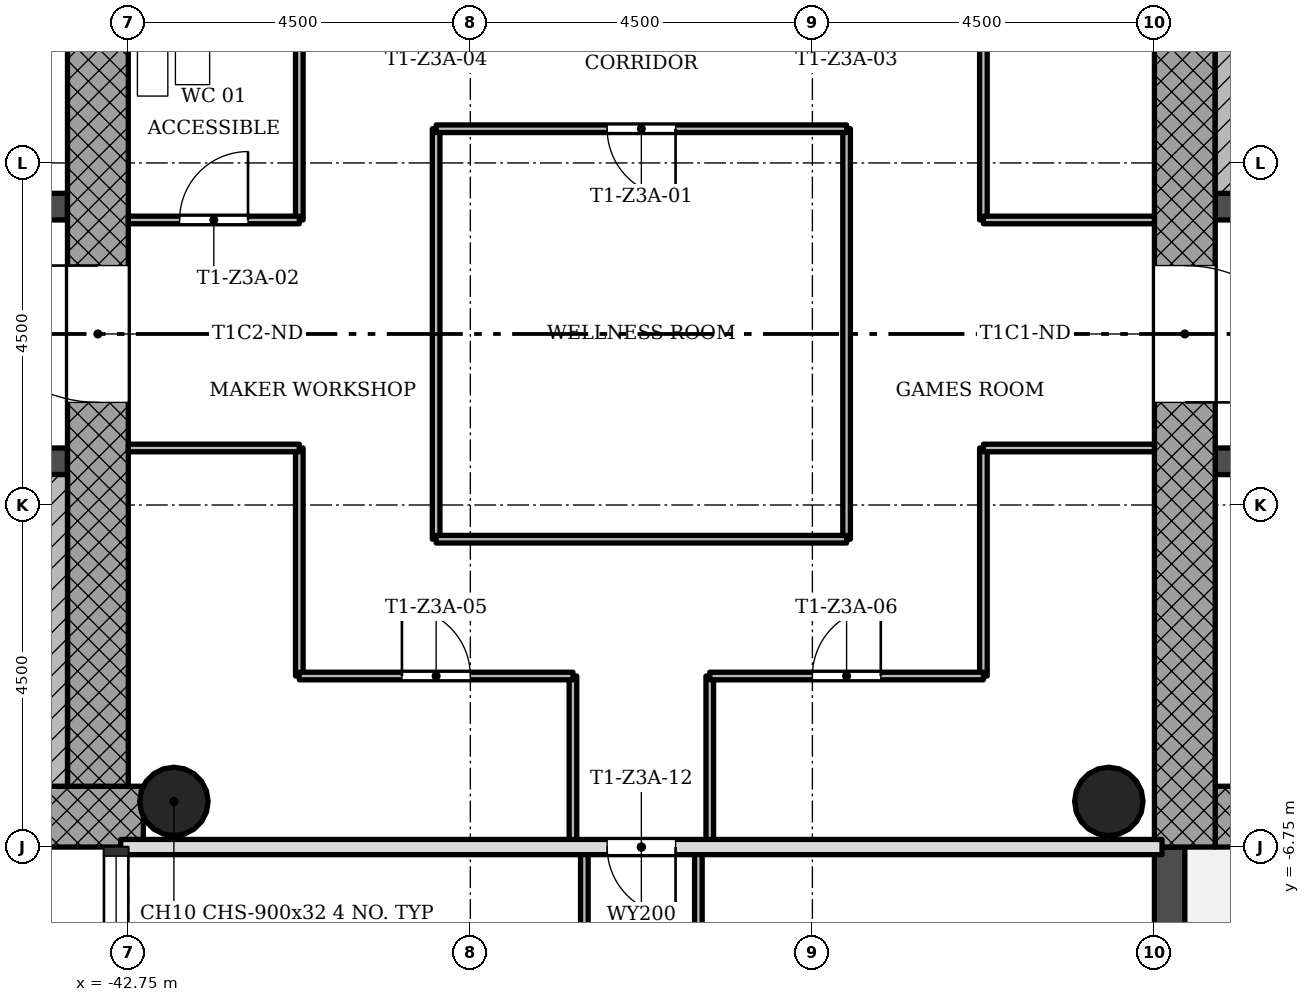
"""IFC4 building model, lengths in metres.
Left out: names, types, materials, properties, quantities, classifications, styles, units other than length and angle.
Written with IfcOpenShell. Run it as: python <this file> out.ifc"""

import sys

from ifc_helpers import new_model, si_unit, direction, frame, frame_2d, origin, origin_2d, place, context, subcontext, project, spatial, rectangle, hollow_circle, extrude, element, fill, save


model = new_model("IFC4")
c1 = context("Model", 3, precision=1e-05, world=origin(), true_north=direction((0.0, 1.0)))
c2 = subcontext(c1, "Body", "Model", "MODEL_VIEW")
j1 = project(units=[si_unit("LENGTHUNIT", "METRE"), si_unit("PLANEANGLEUNIT", "RADIAN")], contexts=[c1])
p1 = place(None, origin())
s1 = spatial("IfcSite", under=j1, at=p1, CompositionType="ELEMENT")
p2 = place(p1, origin())
s2 = spatial("IfcBuilding", under=s1, at=p2, CompositionType="ELEMENT")
p3 = place(p2, frame((0.0, 0.0, 140.5)))
s3 = spatial("IfcBuildingStorey", under=s2, at=p3, CompositionType="ELEMENT", Elevation=140.5)
p4 = place(p3, frame((-28.45, -6.35, 0.0), z_axis=(0.0, 0.0, 1.0), x_axis=(1.0, 0.0, 0.0)))
e1 = element("IfcWall", 1, at=p4, inside=s3, PredefinedType="SHEAR", context=c2, shape_type="SweptSolid", body=[
    extrude(rectangle(XDim=8.2, YDim=0.8, at=frame_2d((4.1, 0.0))), origin(), (0.0, 0.0, 1.0), 3.4),
])
p5 = place(p3, frame((-28.85, 5.95, 0.0), z_axis=(0.0, 0.0, 1.0), x_axis=(0.0, -1.0, 0.0)))
e2 = element("IfcWall", 2, at=p5, inside=s3, PredefinedType="SHEAR", context=c2, shape_type="SweptSolid", body=[
    extrude(rectangle(XDim=12.7, YDim=0.8, at=frame_2d((6.35, 0.0))), origin(), (0.0, 0.0, 1.0), 3.4),
])
p6 = place(p5, frame((5.05, 0.0, 0.0)))
e3 = element("IfcOpeningElement", 3, at=p6, cuts=e2, PredefinedType="OPENING", context=c2, shape_type="SweptSolid", body=[
    extrude(rectangle(XDim=1.8, YDim=2.1, at=frame_2d((0.9, 1.05))), frame((0.0, 0.41, 0.0), z_axis=(0.0, -1.0, 0.0), x_axis=(1.0, 0.0, 0.0)), (0.0, 0.0, 1.0), 0.82),
])
p7 = place(p3, frame((-28.45, -1.675, 0.0), z_axis=(0.0, 0.0, 1.0), x_axis=(1.0, 0.0, 0.0)))
e4 = element("IfcWall", 4, at=p7, inside=s3, PredefinedType="SHEAR", context=c2, shape_type="SweptSolid", body=[
    extrude(rectangle(XDim=7.4, YDim=0.35, at=frame_2d((3.7, 0.0))), origin(), (0.0, 0.0, 1.0), 3.4),
])
p8 = place(p7, frame((0.95, 0.0, 0.0)))
e5 = element("IfcOpeningElement", 5, at=p8, cuts=e4, PredefinedType="OPENING", context=c2, shape_type="SweptSolid", body=[
    extrude(rectangle(XDim=1.1, YDim=2.1, at=frame_2d((0.55, 1.05))), frame((0.0, 0.185, 0.0), z_axis=(0.0, -1.0, 0.0), x_axis=(1.0, 0.0, 0.0)), (0.0, 0.0, 1.0), 0.37),
])
p9 = place(p7, frame((3.15, 0.0, 0.0)))
e6 = element("IfcOpeningElement", 6, at=p9, cuts=e4, PredefinedType="OPENING", context=c2, shape_type="SweptSolid", body=[
    extrude(rectangle(XDim=1.1, YDim=2.1, at=frame_2d((0.55, 1.05))), frame((0.0, 0.185, 0.0), z_axis=(0.0, -1.0, 0.0), x_axis=(1.0, 0.0, 0.0)), (0.0, 0.0, 1.0), 0.37),
])
p10 = place(p7, frame((5.35, 0.0, 0.0)))
e7 = element("IfcOpeningElement", 7, at=p10, cuts=e4, PredefinedType="OPENING", context=c2, shape_type="SweptSolid", body=[
    extrude(rectangle(XDim=1.1, YDim=2.1, at=frame_2d((0.55, 1.05))), frame((0.0, 0.185, 0.0), z_axis=(0.0, -1.0, 0.0), x_axis=(1.0, 0.0, 0.0)), (0.0, 0.0, 1.0), 0.37),
])
p11 = place(p3, frame((-28.45, 1.675, 0.0), z_axis=(0.0, 0.0, 1.0), x_axis=(1.0, 0.0, 0.0)))
e8 = element("IfcWall", 8, at=p11, inside=s3, PredefinedType="SHEAR", context=c2, shape_type="SweptSolid", body=[
    extrude(rectangle(XDim=7.4, YDim=0.35, at=frame_2d((3.7, 0.0))), origin(), (0.0, 0.0, 1.0), 3.4),
])
p12 = place(p11, frame((0.85, 0.0, 0.0)))
e9 = element("IfcOpeningElement", 9, at=p12, cuts=e8, PredefinedType="OPENING", context=c2, shape_type="SweptSolid", body=[
    extrude(rectangle(XDim=0.9, YDim=2.1, at=frame_2d((0.45, 1.05))), frame((0.0, 0.185, 0.0), z_axis=(0.0, -1.0, 0.0), x_axis=(1.0, 0.0, 0.0)), (0.0, 0.0, 1.0), 0.37),
])
p13 = place(p3, frame((-50.95, -6.35, 0.0), z_axis=(0.0, 0.0, 1.0), x_axis=(1.0, 0.0, 0.0)))
e10 = element("IfcWall", 10, at=p13, inside=s3, PredefinedType="SHEAR", context=c2, shape_type="SweptSolid", body=[
    extrude(rectangle(XDim=8.398, YDim=0.8, at=frame_2d((4.199, 0.0))), origin(), (0.0, 0.0, 1.0), 3.4),
])
p14 = place(p3, frame((-43.15, -5.95, 0.0), z_axis=(0.0, 0.0, 1.0), x_axis=(0.0, 1.0, 0.0)))
e11 = element("IfcWall", 11, at=p14, inside=s3, PredefinedType="SHEAR", context=c2, shape_type="SweptSolid", body=[
    extrude(rectangle(XDim=12.7, YDim=0.8, at=frame_2d((6.35, 0.0))), origin(), (0.0, 0.0, 1.0), 3.4),
])
p15 = place(p14, frame((5.05, 0.0, 0.0)))
e12 = element("IfcOpeningElement", 12, at=p15, cuts=e11, PredefinedType="OPENING", context=c2, shape_type="SweptSolid", body=[
    extrude(rectangle(XDim=1.8, YDim=2.1, at=frame_2d((0.9, 1.05))), frame((0.0, 0.41, 0.0), z_axis=(0.0, -1.0, 0.0), x_axis=(1.0, 0.0, 0.0)), (0.0, 0.0, 1.0), 0.82),
])
p16 = place(p3, frame((-50.95, -1.675, 0.0), z_axis=(0.0, 0.0, 1.0), x_axis=(1.0, 0.0, 0.0)))
e13 = element("IfcWall", 13, at=p16, inside=s3, PredefinedType="SHEAR", context=c2, shape_type="SweptSolid", body=[
    extrude(rectangle(XDim=7.4, YDim=0.35, at=frame_2d((3.7, 0.0))), origin(), (0.0, 0.0, 1.0), 3.4),
])
p17 = place(p16, frame((5.65, 0.0, 0.0)))
e14 = element("IfcOpeningElement", 14, at=p17, cuts=e13, PredefinedType="OPENING", context=c2, shape_type="SweptSolid", body=[
    extrude(rectangle(XDim=0.9, YDim=2.1, at=frame_2d((0.45, 1.05))), frame((0.0, 0.185, 0.0), z_axis=(0.0, -1.0, 0.0), x_axis=(1.0, 0.0, 0.0)), (0.0, 0.0, 1.0), 0.37),
])
p18 = place(p3, frame((-50.95, 1.675, 0.0), z_axis=(0.0, 0.0, 1.0), x_axis=(1.0, 0.0, 0.0)))
e15 = element("IfcWall", 15, at=p18, inside=s3, PredefinedType="SHEAR", context=c2, shape_type="SweptSolid", body=[
    extrude(rectangle(XDim=7.4, YDim=0.35, at=frame_2d((3.7, 0.0))), origin(), (0.0, 0.0, 1.0), 3.4),
])
p19 = place(p18, frame((5.35, 0.0, 0.0)))
e16 = element("IfcOpeningElement", 16, at=p19, cuts=e15, PredefinedType="OPENING", context=c2, shape_type="SweptSolid", body=[
    extrude(rectangle(XDim=1.1, YDim=2.1, at=frame_2d((0.55, 1.05))), frame((0.0, 0.185, 0.0), z_axis=(0.0, -1.0, 0.0), x_axis=(1.0, 0.0, 0.0)), (0.0, 0.0, 1.0), 0.37),
])
p20 = place(p18, frame((1.0, 0.0, 0.0)))
e17 = element("IfcOpeningElement", 17, at=p20, cuts=e15, PredefinedType="OPENING", context=c2, shape_type="SweptSolid", body=[
    extrude(rectangle(XDim=1.1, YDim=2.1, at=frame_2d((0.55, 1.05))), frame((0.0, 0.185, 0.0), z_axis=(0.0, -1.0, 0.0), x_axis=(1.0, 0.0, 0.0)), (0.0, 0.0, 1.0), 0.37),
])
p21 = place(p18, frame((3.3, 0.0, 0.0)))
e18 = element("IfcOpeningElement", 18, at=p21, cuts=e15, PredefinedType="OPENING", context=c2, shape_type="SweptSolid", body=[
    extrude(rectangle(XDim=0.9, YDim=2.1, at=frame_2d((0.45, 1.05))), frame((0.0, 0.185, 0.0), z_axis=(0.0, -1.0, 0.0), x_axis=(1.0, 0.0, 0.0)), (0.0, 0.0, 1.0), 0.37),
])
for number, where, z_axis, x_axis in (
    (19, (-42.15, -6.15, 0.0), (0.0, 0.0, 1.0), (1.0, 0.0, 0.0)),
    (20, (-29.85, -6.15, 0.0), (0.0, 0.0, 1.0), (1.0, 0.0, 0.0)),
):
    element("IfcColumn", number, at=place(p3, frame(where, z_axis=z_axis, x_axis=x_axis)), inside=s3, PredefinedType="COLUMN", context=c2, shape_type="SweptSolid", body=[
        extrude(hollow_circle(Radius=0.45, WallThickness=0.032, at=origin_2d()), origin(), (0.0, 0.0, 1.0), 3.4),
    ])
p22 = place(p3, frame((-29.05, -11.25, -0.02), z_axis=(0.0, 0.0, 1.0), x_axis=(0.0, 1.0, 0.0)))
e21 = element("IfcWall", 21, at=p22, inside=s3, PredefinedType="STANDARD", context=c2, shape_type="SweptSolid", body=[
    extrude(rectangle(XDim=4.5, YDim=0.4, at=frame_2d((2.25, 0.0))), origin(), (0.0, 0.0, 1.0), 3.12),
])
p23 = place(p22, frame((1.35, 0.0, 0.02)))
e22 = element("IfcOpeningElement", 22, at=p23, cuts=e21, PredefinedType="OPENING", context=c2, shape_type="SweptSolid", body=[
    extrude(rectangle(XDim=1.8, YDim=2.1, at=frame_2d((0.9, 1.05))), frame((0.0, 0.21, 0.0), z_axis=(0.0, -1.0, 0.0), x_axis=(1.0, 0.0, 0.0)), (0.0, 0.0, 1.0), 0.42),
])
for number, where, z_axis, x_axis in (
    (23, (-40.5, -4.5, 0.0), (0.0, 0.0, 1.0), (0.0, 1.0, 0.0)),
    (24, (-40.5, 1.5, 0.0), (0.0, 0.0, 1.0), (0.0, 1.0, 0.0)),
):
    element("IfcWall", number, at=place(p3, frame(where, z_axis=z_axis, x_axis=x_axis)), inside=s3, PredefinedType="PARTITIONING", context=c2, shape_type="SweptSolid", body=[
        extrude(rectangle(XDim=3.0, YDim=0.1, at=frame_2d((1.5, 0.0))), origin(), (0.0, 0.0, 1.0), 3.0),
    ])
p24 = place(p3, frame((-38.7, -2.7, 0.0), z_axis=(0.0, 0.0, 1.0), x_axis=(0.0, 1.0, 0.0)))
e25 = element("IfcWall", 25, at=p24, inside=s3, PredefinedType="PARTITIONING", context=c2, shape_type="SweptSolid", body=[
    extrude(rectangle(XDim=5.4, YDim=0.1, at=frame_2d((2.7, 0.0))), origin(), (0.0, 0.0, 1.0), 3.0),
])
p25 = place(p3, frame((-36.9, -6.75, 0.0), z_axis=(0.0, 0.0, 1.0), x_axis=(0.0, 1.0, 0.0)))
e26 = element("IfcWall", 26, at=p25, inside=s3, PredefinedType="PARTITIONING", context=c2, shape_type="SweptSolid", body=[
    extrude(rectangle(XDim=2.25, YDim=0.1, at=frame_2d((1.125, 0.0))), origin(), (0.0, 0.0, 1.0), 3.0),
])
p26 = place(p3, frame((-36.75, -11.25, 0.0), z_axis=(0.0, 0.0, 1.0), x_axis=(0.0, 1.0, 0.0)))
e27 = element("IfcWall", 27, at=p26, inside=s3, PredefinedType="PARTITIONING", context=c2, shape_type="SweptSolid", body=[
    extrude(rectangle(XDim=4.5, YDim=0.1, at=frame_2d((2.25, 0.0))), origin(), (0.0, 0.0, 1.0), 3.0),
])
p27 = place(p26, frame((1.8, 0.0, 0.0)))
e28 = element("IfcOpeningElement", 28, at=p27, cuts=e27, PredefinedType="OPENING", context=c2, shape_type="SweptSolid", body=[
    extrude(rectangle(XDim=0.9, YDim=2.1, at=frame_2d((0.45, 1.05))), frame((0.0, 0.06, 0.0), z_axis=(0.0, -1.0, 0.0), x_axis=(1.0, 0.0, 0.0)), (0.0, 0.0, 1.0), 0.12),
])
p28 = place(p3, frame((-35.25, -11.25, 0.0), z_axis=(0.0, 0.0, 1.0), x_axis=(0.0, 1.0, 0.0)))
e29 = element("IfcWall", 29, at=p28, inside=s3, PredefinedType="PARTITIONING", context=c2, shape_type="SweptSolid", body=[
    extrude(rectangle(XDim=4.5, YDim=0.1, at=frame_2d((2.25, 0.0))), origin(), (0.0, 0.0, 1.0), 3.0),
])
p29 = place(p28, frame((1.8, 0.0, 0.0)))
e30 = element("IfcOpeningElement", 30, at=p29, cuts=e29, PredefinedType="OPENING", context=c2, shape_type="SweptSolid", body=[
    extrude(rectangle(XDim=0.9, YDim=2.1, at=frame_2d((0.45, 1.05))), frame((0.0, 0.06, 0.0), z_axis=(0.0, -1.0, 0.0), x_axis=(1.0, 0.0, 0.0)), (0.0, 0.0, 1.0), 0.12),
])
p30 = place(p3, frame((-35.1, -6.75, 0.0), z_axis=(0.0, 0.0, 1.0), x_axis=(0.0, 1.0, 0.0)))
e31 = element("IfcWall", 31, at=p30, inside=s3, PredefinedType="PARTITIONING", context=c2, shape_type="SweptSolid", body=[
    extrude(rectangle(XDim=2.25, YDim=0.1, at=frame_2d((1.125, 0.0))), origin(), (0.0, 0.0, 1.0), 3.0),
])
p31 = place(p3, frame((-33.3, -2.7, 0.0), z_axis=(0.0, 0.0, 1.0), x_axis=(0.0, 1.0, 0.0)))
e32 = element("IfcWall", 32, at=p31, inside=s3, PredefinedType="PARTITIONING", context=c2, shape_type="SweptSolid", body=[
    extrude(rectangle(XDim=5.4, YDim=0.1, at=frame_2d((2.7, 0.0))), origin(), (0.0, 0.0, 1.0), 3.0),
])
for number, where, z_axis, x_axis in (
    (33, (-31.5, -4.5, 0.0), (0.0, 0.0, 1.0), (0.0, 1.0, 0.0)),
    (34, (-31.5, 1.5, 0.0), (0.0, 0.0, 1.0), (0.0, 1.0, 0.0)),
):
    element("IfcWall", number, at=place(p3, frame(where, z_axis=z_axis, x_axis=x_axis)), inside=s3, PredefinedType="PARTITIONING", context=c2, shape_type="SweptSolid", body=[
        extrude(rectangle(XDim=3.0, YDim=0.1, at=frame_2d((1.5, 0.0))), origin(), (0.0, 0.0, 1.0), 3.0),
    ])
p32 = place(p3, frame((-42.85, -6.75, 0.0), z_axis=(0.0, 0.0, 1.0), x_axis=(1.0, 0.0, 0.0)))
e35 = element("IfcWall", 35, at=p32, inside=s3, PredefinedType="SOLIDWALL", context=c2, shape_type="SweptSolid", body=[
    extrude(rectangle(XDim=13.7, YDim=0.2, at=frame_2d((6.85, 0.0))), origin(), (0.0, 0.0, 1.0), 3.0),
])
p33 = place(p32, frame((6.4, 0.0, 0.0)))
e36 = element("IfcOpeningElement", 36, at=p33, cuts=e35, PredefinedType="OPENING", context=c2, shape_type="SweptSolid", body=[
    extrude(rectangle(XDim=0.9, YDim=2.1, at=frame_2d((0.45, 1.05))), frame((0.0, 0.11, 0.0), z_axis=(0.0, -1.0, 0.0), x_axis=(1.0, 0.0, 0.0)), (0.0, 0.0, 1.0), 0.22),
])
p34 = place(p3, frame((-40.5, -4.5, 0.0), z_axis=(0.0, 0.0, 1.0), x_axis=(1.0, 0.0, 0.0)))
e37 = element("IfcWall", 37, at=p34, inside=s3, PredefinedType="PARTITIONING", context=c2, shape_type="SweptSolid", body=[
    extrude(rectangle(XDim=3.6, YDim=0.1, at=frame_2d((1.8, 0.0))), origin(), (0.0, 0.0, 1.0), 3.0),
])
p35 = place(p34, frame((1.35, 0.0, 0.0)))
e38 = element("IfcOpeningElement", 38, at=p35, cuts=e37, PredefinedType="OPENING", context=c2, shape_type="SweptSolid", body=[
    extrude(rectangle(XDim=0.9, YDim=2.1, at=frame_2d((0.45, 1.05))), frame((0.0, 0.06, 0.0), z_axis=(0.0, -1.0, 0.0), x_axis=(1.0, 0.0, 0.0)), (0.0, 0.0, 1.0), 0.12),
])
p36 = place(p3, frame((-35.1, -4.5, 0.0), z_axis=(0.0, 0.0, 1.0), x_axis=(1.0, 0.0, 0.0)))
e39 = element("IfcWall", 39, at=p36, inside=s3, PredefinedType="PARTITIONING", context=c2, shape_type="SweptSolid", body=[
    extrude(rectangle(XDim=3.6, YDim=0.1, at=frame_2d((1.8, 0.0))), origin(), (0.0, 0.0, 1.0), 3.0),
])
p37 = place(p36, frame((1.35, 0.0, 0.0)))
e40 = element("IfcOpeningElement", 40, at=p37, cuts=e39, PredefinedType="OPENING", context=c2, shape_type="SweptSolid", body=[
    extrude(rectangle(XDim=0.9, YDim=2.1, at=frame_2d((0.45, 1.05))), frame((0.0, 0.06, 0.0), z_axis=(0.0, -1.0, 0.0), x_axis=(1.0, 0.0, 0.0)), (0.0, 0.0, 1.0), 0.12),
])
p38 = place(p3, frame((-38.7, -2.7, 0.0), z_axis=(0.0, 0.0, 1.0), x_axis=(1.0, 0.0, 0.0)))
e41 = element("IfcWall", 41, at=p38, inside=s3, PredefinedType="PARTITIONING", context=c2, shape_type="SweptSolid", body=[
    extrude(rectangle(XDim=5.4, YDim=0.1, at=frame_2d((2.7, 0.0))), origin(), (0.0, 0.0, 1.0), 3.0),
])
for number, where, z_axis, x_axis in (
    (42, (-42.75, -1.5, 0.0), (0.0, 0.0, 1.0), (1.0, 0.0, 0.0)),
    (43, (-31.5, -1.5, 0.0), (0.0, 0.0, 1.0), (1.0, 0.0, 0.0)),
):
    element("IfcWall", number, at=place(p3, frame(where, z_axis=z_axis, x_axis=x_axis)), inside=s3, PredefinedType="PARTITIONING", context=c2, shape_type="SweptSolid", body=[
        extrude(rectangle(XDim=2.25, YDim=0.1, at=frame_2d((1.125, 0.0))), origin(), (0.0, 0.0, 1.0), 3.0),
    ])
p39 = place(p3, frame((-42.75, 1.5, 0.0), z_axis=(0.0, 0.0, 1.0), x_axis=(1.0, 0.0, 0.0)))
e44 = element("IfcWall", 44, at=p39, inside=s3, PredefinedType="PARTITIONING", context=c2, shape_type="SweptSolid", body=[
    extrude(rectangle(XDim=2.25, YDim=0.1, at=frame_2d((1.125, 0.0))), origin(), (0.0, 0.0, 1.0), 3.0),
])
p40 = place(p39, frame((0.675, 0.0, 0.0)))
e45 = element("IfcOpeningElement", 45, at=p40, cuts=e44, PredefinedType="OPENING", context=c2, shape_type="SweptSolid", body=[
    extrude(rectangle(XDim=0.9, YDim=2.1, at=frame_2d((0.45, 1.05))), frame((0.0, 0.06, 0.0), z_axis=(0.0, -1.0, 0.0), x_axis=(1.0, 0.0, 0.0)), (0.0, 0.0, 1.0), 0.12),
])
p41 = place(p3, frame((-31.5, 1.5, 0.0), z_axis=(0.0, 0.0, 1.0), x_axis=(1.0, 0.0, 0.0)))
e46 = element("IfcWall", 46, at=p41, inside=s3, PredefinedType="PARTITIONING", context=c2, shape_type="SweptSolid", body=[
    extrude(rectangle(XDim=2.25, YDim=0.1, at=frame_2d((1.125, 0.0))), origin(), (0.0, 0.0, 1.0), 3.0),
])
p42 = place(p3, frame((-38.7, 2.7, 0.0), z_axis=(0.0, 0.0, 1.0), x_axis=(1.0, 0.0, 0.0)))
e47 = element("IfcWall", 47, at=p42, inside=s3, PredefinedType="PARTITIONING", context=c2, shape_type="SweptSolid", body=[
    extrude(rectangle(XDim=5.4, YDim=0.1, at=frame_2d((2.7, 0.0))), origin(), (0.0, 0.0, 1.0), 3.0),
])
p43 = place(p42, frame((2.25, 0.0, 0.0)))
e48 = element("IfcOpeningElement", 48, at=p43, cuts=e47, PredefinedType="OPENING", context=c2, shape_type="SweptSolid", body=[
    extrude(rectangle(XDim=0.9, YDim=2.1, at=frame_2d((0.45, 1.05))), frame((0.0, 0.06, 0.0), z_axis=(0.0, -1.0, 0.0), x_axis=(1.0, 0.0, 0.0)), (0.0, 0.0, 1.0), 0.12),
])
for number, where, z_axis, x_axis in (
    (49, (-28.25, 1.85, 0.0), (0.0, 0.0, 1.0), (0.0, 1.0, 0.0)),
    (50, (-43.75, -1.85, 0.0), (0.0, 0.0, 1.0), (0.0, -1.0, 0.0)),
):
    element("IfcWall", number, at=place(p3, frame(where, z_axis=z_axis, x_axis=x_axis)), inside=s3, PredefinedType="SHEAR", context=c2, shape_type="SweptSolid", body=[
        extrude(rectangle(XDim=4.1, YDim=0.4, at=frame_2d((2.05, 0.0))), origin(), (0.0, 0.0, 1.0), 3.4),
    ])
p44 = place(p43, origin())
e51 = element("IfcDoor", 51, at=p44, inside=s3, OperationType="SINGLE_SWING_RIGHT", PredefinedType="DOOR", context=c2, shape_type="SweptSolid", body=[
    extrude(rectangle(XDim=0.9, YDim=2.1, at=frame_2d((0.45, 1.05))), frame((0.0, 0.025, 0.0), z_axis=(0.0, -1.0, 0.0), x_axis=(1.0, 0.0, 0.0)), (0.0, 0.0, 1.0), 0.05),
])
fill(e48, e51)
p45 = place(p40, origin())
e52 = element("IfcDoor", 52, at=p45, inside=s3, OperationType="SINGLE_SWING_LEFT", PredefinedType="DOOR", context=c2, shape_type="SweptSolid", body=[
    extrude(rectangle(XDim=0.9, YDim=2.1, at=frame_2d((0.45, 1.05))), frame((0.0, 0.025, 0.0), z_axis=(0.0, -1.0, 0.0), x_axis=(1.0, 0.0, 0.0)), (0.0, 0.0, 1.0), 0.05),
])
fill(e45, e52)
p46 = place(p35, origin())
e53 = element("IfcDoor", 53, at=p46, inside=s3, OperationType="SINGLE_SWING_RIGHT", PredefinedType="DOOR", context=c2, shape_type="SweptSolid", body=[
    extrude(rectangle(XDim=0.9, YDim=2.1, at=frame_2d((0.45, 1.05))), frame((0.0, 0.025, 0.0), z_axis=(0.0, -1.0, 0.0), x_axis=(1.0, 0.0, 0.0)), (0.0, 0.0, 1.0), 0.05),
])
fill(e38, e53)
p47 = place(p37, origin())
e54 = element("IfcDoor", 54, at=p47, inside=s3, OperationType="SINGLE_SWING_LEFT", PredefinedType="DOOR", context=c2, shape_type="SweptSolid", body=[
    extrude(rectangle(XDim=0.9, YDim=2.1, at=frame_2d((0.45, 1.05))), frame((0.0, 0.025, 0.0), z_axis=(0.0, -1.0, 0.0), x_axis=(1.0, 0.0, 0.0)), (0.0, 0.0, 1.0), 0.05),
])
fill(e40, e54)
p48 = place(p33, origin())
e55 = element("IfcDoor", 55, at=p48, inside=s3, OperationType="SINGLE_SWING_RIGHT", PredefinedType="DOOR", context=c2, shape_type="SweptSolid", body=[
    extrude(rectangle(XDim=0.9, YDim=2.1, at=frame_2d((0.45, 1.05))), frame((0.0, 0.025, 0.0), z_axis=(0.0, -1.0, 0.0), x_axis=(1.0, 0.0, 0.0)), (0.0, 0.0, 1.0), 0.05),
])
fill(e36, e55)
p49 = place(p6, origin())
e56 = element("IfcDoor", 56, at=p49, inside=s3, OperationType="SINGLE_SWING_LEFT", PredefinedType="DOOR", context=c2, shape_type="SweptSolid", body=[
    extrude(rectangle(XDim=1.8, YDim=2.1, at=frame_2d((0.9, 1.05))), frame((0.0, 0.025, 0.0), z_axis=(0.0, -1.0, 0.0), x_axis=(1.0, 0.0, 0.0)), (0.0, 0.0, 1.0), 0.05),
])
fill(e3, e56)
p50 = place(p15, origin())
e57 = element("IfcDoor", 57, at=p50, inside=s3, OperationType="SINGLE_SWING_LEFT", PredefinedType="DOOR", context=c2, shape_type="SweptSolid", body=[
    extrude(rectangle(XDim=1.8, YDim=2.1, at=frame_2d((0.9, 1.05))), frame((0.0, 0.025, 0.0), z_axis=(0.0, -1.0, 0.0), x_axis=(1.0, 0.0, 0.0)), (0.0, 0.0, 1.0), 0.05),
])
fill(e12, e57)
save(model, sys.argv[1])
